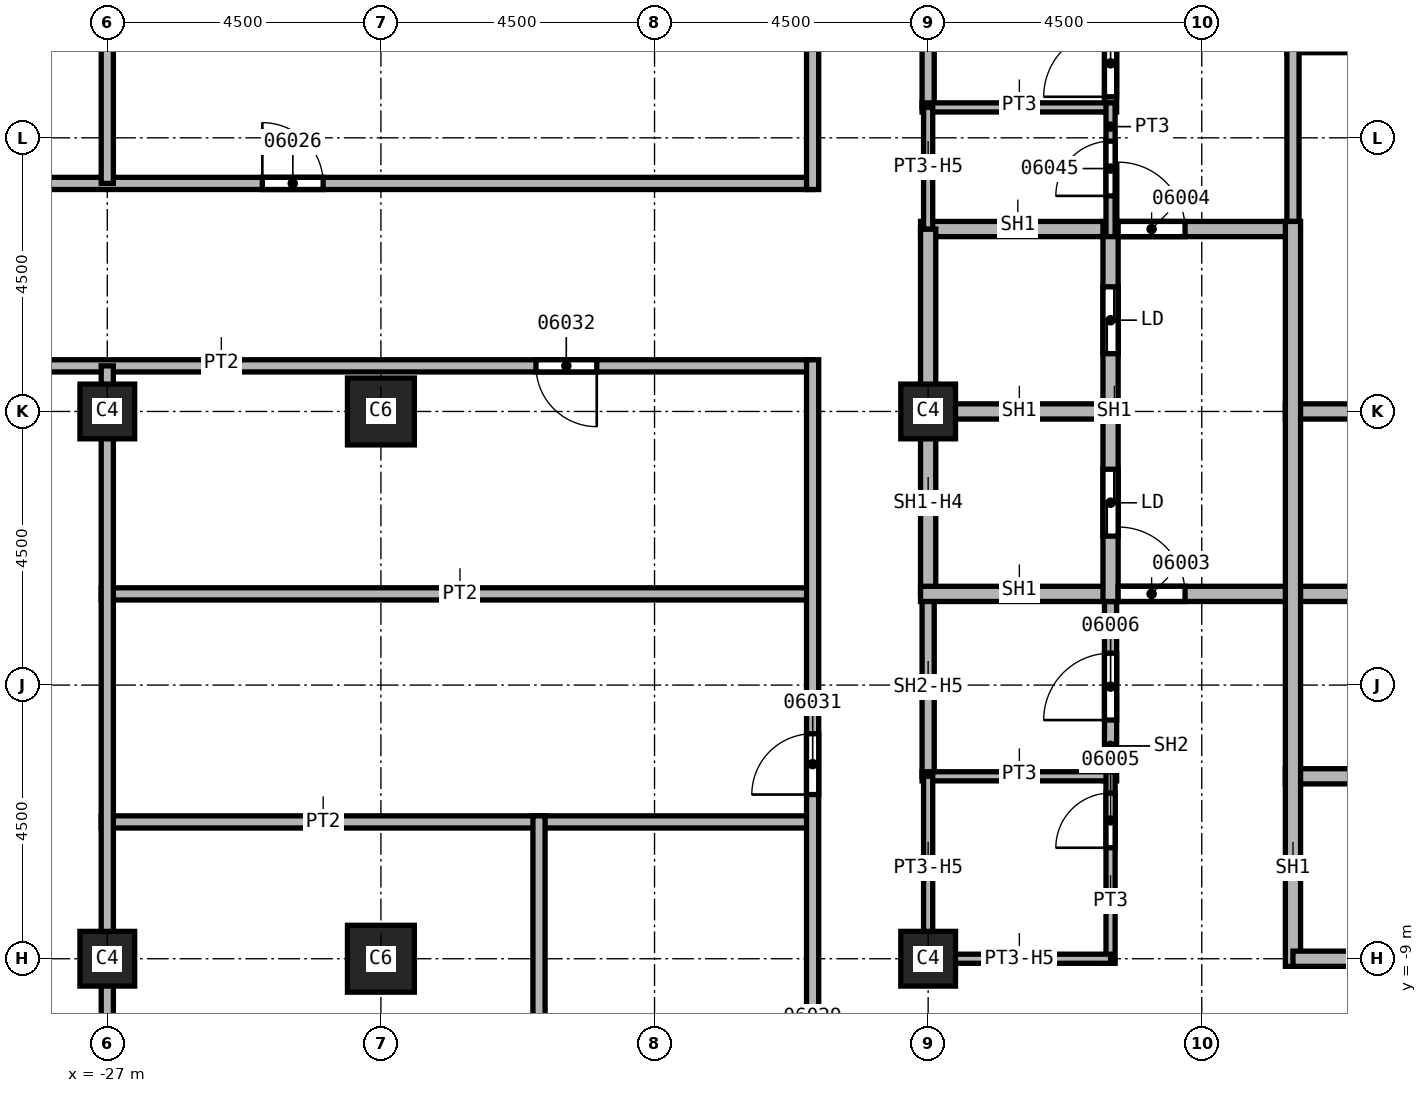
"""IFC4 building model, lengths in metres.
Left out: names, types, materials, properties, quantities, classifications, styles, units other than length and angle.
Written with IfcOpenShell. Run it as: python <this file> out.ifc"""

import sys

from ifc_helpers import new_model, si_unit, direction, frame, frame_2d, origin, origin_2d, place, context, subcontext, project, spatial, rectangle, extrude, element, fill, save


model = new_model("IFC4")
c1 = context("Model", 3, precision=1e-05, world=origin(), true_north=direction((0.0, 1.0)))
c2 = subcontext(c1, "Body", "Model", "MODEL_VIEW")
j1 = project(units=[si_unit("LENGTHUNIT", "METRE"), si_unit("PLANEANGLEUNIT", "RADIAN")], contexts=[c1])
p1 = place(None, origin())
s1 = spatial("IfcSite", under=j1, at=p1, CompositionType="ELEMENT")
p2 = place(p1, origin())
s2 = spatial("IfcBuilding", under=s1, at=p2, CompositionType="ELEMENT")
p3 = place(p2, frame((0.0, 0.0, 126.0)))
s3 = spatial("IfcBuildingStorey", under=s2, at=p3, CompositionType="ELEMENT", Elevation=126.0)
for number, where, z_axis, x_axis in (
    (1, (-22.5, 0.0, 0.0), (0.0, 0.0, 1.0), (1.0, 0.0, 0.0)),
    (2, (-22.5, -9.0, 0.0), (0.0, 0.0, 1.0), (1.0, 0.0, 0.0)),
):
    element("IfcColumn", number, at=place(p3, frame(where, z_axis=z_axis, x_axis=x_axis)), inside=s3, PredefinedType="COLUMN", context=c2, shape_type="SweptSolid", body=[
        extrude(rectangle(XDim=1.1, YDim=1.1, at=origin_2d()), origin(), (0.0, 0.0, 1.0), 3.7),
    ])
for number, where, z_axis, x_axis in (
    (3, (-13.5, 0.0, 0.0), (0.0, 0.0, 1.0), (1.0, 0.0, 0.0)),
    (4, (-13.5, -9.0, 0.0), (0.0, 0.0, 1.0), (1.0, 0.0, 0.0)),
    (5, (-27.0, 0.0, 0.0), (0.0, 0.0, 1.0), (1.0, 0.0, 0.0)),
    (6, (-27.0, -9.0, 0.0), (0.0, 0.0, 1.0), (1.0, 0.0, 0.0)),
):
    element("IfcColumn", number, at=place(p3, frame(where, z_axis=z_axis, x_axis=x_axis)), inside=s3, PredefinedType="COLUMN", context=c2, shape_type="SweptSolid", body=[
        extrude(rectangle(XDim=0.9, YDim=0.9, at=origin_2d()), origin(), (0.0, 0.0, 1.0), 3.7),
    ])
p4 = place(p3, frame((-33.85, 3.75, 0.0), z_axis=(0.0, 0.0, 1.0), x_axis=(1.0, 0.0, 0.0)))
e7 = element("IfcWall", 7, at=p4, inside=s3, PredefinedType="PARTITIONING", context=c2, shape_type="SweptSolid", body=[
    extrude(rectangle(XDim=18.45, YDim=0.2, at=frame_2d((9.225, 0.0))), origin(), (0.0, 0.0, 1.0), 3.7),
])
p5 = place(p4, frame((9.4, 0.0, 0.0)))
e8 = element("IfcOpeningElement", 8, at=p5, cuts=e7, PredefinedType="OPENING", context=c2, shape_type="SweptSolid", body=[
    extrude(rectangle(XDim=1.0, YDim=2.1, at=frame_2d((0.5, 1.05))), frame((0.0, 0.1, 0.0), z_axis=(0.0, -1.0, 0.0), x_axis=(1.0, 0.0, 0.0)), (0.0, 0.0, 1.0), 0.2),
])
p6 = place(p3, frame((-15.4, 0.75, 0.0), z_axis=(0.0, 0.0, 1.0), x_axis=(-1.0, 0.0, 0.0)))
e9 = element("IfcWall", 9, at=p6, inside=s3, PredefinedType="PARTITIONING", context=c2, shape_type="SweptSolid", body=[
    extrude(rectangle(XDim=18.45, YDim=0.2, at=frame_2d((9.225, 0.0))), origin(), (0.0, 0.0, 1.0), 3.7),
])
p7 = place(p6, frame((3.55, 0.0, 0.0)))
e10 = element("IfcOpeningElement", 10, at=p7, cuts=e9, PredefinedType="OPENING", context=c2, shape_type="SweptSolid", body=[
    extrude(rectangle(XDim=1.0, YDim=2.1, at=frame_2d((0.5, 1.05))), frame((0.0, 0.1, 0.0), z_axis=(0.0, -1.0, 0.0), x_axis=(1.0, 0.0, 0.0)), (0.0, 0.0, 1.0), 0.2),
])
p8 = place(p6, frame((14.9, 0.0, 0.0)))
e11 = element("IfcOpeningElement", 11, at=p8, cuts=e9, PredefinedType="OPENING", context=c2, shape_type="SweptSolid", body=[
    extrude(rectangle(XDim=1.0, YDim=2.1, at=frame_2d((0.5, 1.05))), frame((0.0, 0.1, 0.0), z_axis=(0.0, -1.0, 0.0), x_axis=(1.0, 0.0, 0.0)), (0.0, 0.0, 1.0), 0.2),
])
for number, where, z_axis, x_axis in (
    (12, (-27.1, -6.75, 0.0), (0.0, 0.0, 1.0), (1.0, 0.0, 0.0)),
    (13, (-27.1, -3.0, 0.0), (0.0, 0.0, 1.0), (1.0, 0.0, 0.0)),
):
    element("IfcWall", number, at=place(p3, frame(where, z_axis=z_axis, x_axis=x_axis)), inside=s3, PredefinedType="PARTITIONING", context=c2, shape_type="SweptSolid", body=[
        extrude(rectangle(XDim=11.7, YDim=0.2, at=frame_2d((5.85, 0.0))), origin(), (0.0, 0.0, 1.0), 3.7),
    ])
p9 = place(p3, frame((-27.0, -17.45, 0.0), z_axis=(0.0, 0.0, 1.0), x_axis=(0.0, 1.0, 0.0)))
e14 = element("IfcWall", 14, at=p9, inside=s3, PredefinedType="PARTITIONING", context=c2, shape_type="SweptSolid", body=[
    extrude(rectangle(XDim=18.2, YDim=0.2, at=frame_2d((9.1, 0.0))), origin(), (0.0, 0.0, 1.0), 3.7),
])
p10 = place(p3, frame((-27.0, 3.75, 0.0), z_axis=(0.0, 0.0, 1.0), x_axis=(0.0, 1.0, 0.0)))
e15 = element("IfcWall", 15, at=p10, inside=s3, PredefinedType="PARTITIONING", context=c2, shape_type="SweptSolid", body=[
    extrude(rectangle(XDim=13.7, YDim=0.2, at=frame_2d((6.85, 0.0))), origin(), (0.0, 0.0, 1.0), 3.7),
])
p11 = place(p3, frame((-19.9, -23.25, 0.0), z_axis=(0.0, 0.0, 1.0), x_axis=(0.0, 1.0, 0.0)))
e16 = element("IfcWall", 16, at=p11, inside=s3, PredefinedType="PARTITIONING", context=c2, shape_type="SweptSolid", body=[
    extrude(rectangle(XDim=16.6, YDim=0.2, at=frame_2d((8.3, 0.0))), origin(), (0.0, 0.0, 1.0), 3.7),
])
p12 = place(p11, frame((11.0, 0.0, 0.0)))
e17 = element("IfcOpeningElement", 17, at=p12, cuts=e16, PredefinedType="OPENING", context=c2, shape_type="SweptSolid", body=[
    extrude(rectangle(XDim=1.0, YDim=2.1, at=frame_2d((0.5, 1.05))), frame((0.0, 0.1, 0.0), z_axis=(0.0, -1.0, 0.0), x_axis=(1.0, 0.0, 0.0)), (0.0, 0.0, 1.0), 0.2),
])
p13 = place(p3, frame((-15.4, -23.25, 0.0), z_axis=(0.0, 0.0, 1.0), x_axis=(0.0, 1.0, 0.0)))
e18 = element("IfcWall", 18, at=p13, inside=s3, PredefinedType="PARTITIONING", context=c2, shape_type="SweptSolid", body=[
    extrude(rectangle(XDim=24.1, YDim=0.2, at=frame_2d((12.05, 0.0))), origin(), (0.0, 0.0, 1.0), 3.7),
])
p14 = place(p13, frame((4.6, 0.0, 0.0)))
e19 = element("IfcOpeningElement", 19, at=p14, cuts=e18, PredefinedType="OPENING", context=c2, shape_type="SweptSolid", body=[
    extrude(rectangle(XDim=1.0, YDim=2.1, at=frame_2d((0.5, 1.05))), frame((0.0, 0.1, 0.0), z_axis=(0.0, -1.0, 0.0), x_axis=(1.0, 0.0, 0.0)), (0.0, 0.0, 1.0), 0.2),
])
p15 = place(p13, frame((11.8, 0.0, 0.0)))
e20 = element("IfcOpeningElement", 20, at=p15, cuts=e18, PredefinedType="OPENING", context=c2, shape_type="SweptSolid", body=[
    extrude(rectangle(XDim=1.0, YDim=2.1, at=frame_2d((0.5, 1.05))), frame((0.0, 0.1, 0.0), z_axis=(0.0, -1.0, 0.0), x_axis=(1.0, 0.0, 0.0)), (0.0, 0.0, 1.0), 0.2),
])
p16 = place(p13, frame((16.95, 0.0, 0.0)))
e21 = element("IfcOpeningElement", 21, at=p16, cuts=e18, PredefinedType="OPENING", context=c2, shape_type="SweptSolid", body=[
    extrude(rectangle(XDim=1.0, YDim=2.1, at=frame_2d((0.5, 1.05))), frame((0.0, 0.1, 0.0), z_axis=(0.0, -1.0, 0.0), x_axis=(1.0, 0.0, 0.0)), (0.0, 0.0, 1.0), 0.2),
])
p17 = place(p3, frame((-15.4, 3.65, 0.0), z_axis=(0.0, 0.0, 1.0), x_axis=(0.0, 1.0, 0.0)))
e22 = element("IfcWall", 22, at=p17, inside=s3, PredefinedType="PARTITIONING", context=c2, shape_type="SweptSolid", body=[
    extrude(rectangle(XDim=9.95, YDim=0.2, at=frame_2d((4.975, 0.0))), origin(), (0.0, 0.0, 1.0), 3.7),
])
p18 = place(p3, frame((-13.5, -6.0, 0.0), z_axis=(0.0, 0.0, 1.0), x_axis=(0.0, 1.0, 0.0)))
e23 = element("IfcWall", 23, at=p18, inside=s3, PredefinedType="SOLIDWALL", context=c2, shape_type="SweptSolid", body=[
    extrude(rectangle(XDim=3.0, YDim=0.2, at=frame_2d((1.5, 0.0))), origin(), (0.0, 0.0, 1.0), 2.938),
])
p19 = place(p3, frame((-13.5, 5.0, 0.0), z_axis=(0.0, 0.0, 1.0), x_axis=(0.0, 1.0, 0.0)))
e24 = element("IfcWall", 24, at=p19, inside=s3, PredefinedType="SOLIDWALL", context=c2, shape_type="SweptSolid", body=[
    extrude(rectangle(XDim=4.1, YDim=0.2, at=frame_2d((2.05, 0.0))), origin(), (0.0, 0.0, 1.0), 2.938),
])
p20 = place(p3, frame((-10.5, -6.075, 0.0), z_axis=(0.0, 0.0, 1.0), x_axis=(0.0, 1.0, 0.0)))
e25 = element("IfcWall", 25, at=p20, inside=s3, PredefinedType="SOLIDWALL", context=c2, shape_type="SweptSolid", body=[
    extrude(rectangle(XDim=3.2, YDim=0.2, at=frame_2d((1.6, 0.0))), origin(), (0.0, 0.0, 1.0), 3.7),
])
p21 = place(p20, frame((1.0, 0.0, 0.0)))
e26 = element("IfcOpeningElement", 26, at=p21, cuts=e25, PredefinedType="OPENING", context=c2, shape_type="SweptSolid", body=[
    extrude(rectangle(XDim=1.1, YDim=2.1, at=frame_2d((0.55, 1.05))), frame((0.0, 0.1, 0.0), z_axis=(0.0, -1.0, 0.0), x_axis=(1.0, 0.0, 0.0)), (0.0, 0.0, 1.0), 0.2),
])
p22 = place(p3, frame((-10.5, 4.925, 0.0), z_axis=(0.0, 0.0, 1.0), x_axis=(0.0, 1.0, 0.0)))
e27 = element("IfcWall", 27, at=p22, inside=s3, PredefinedType="SOLIDWALL", context=c2, shape_type="SweptSolid", body=[
    extrude(rectangle(XDim=4.175, YDim=0.2, at=frame_2d((2.087, 0.0))), origin(), (0.0, 0.0, 1.0), 3.7),
])
p23 = place(p22, frame((0.25, 0.0, 0.0)))
e28 = element("IfcOpeningElement", 28, at=p23, cuts=e27, PredefinedType="OPENING", context=c2, shape_type="SweptSolid", body=[
    extrude(rectangle(XDim=1.1, YDim=2.1, at=frame_2d((0.55, 1.05))), frame((0.0, 0.1, 0.0), z_axis=(0.0, -1.0, 0.0), x_axis=(1.0, 0.0, 0.0)), (0.0, 0.0, 1.0), 0.2),
])
p24 = place(p3, frame((-7.5, 2.875, 0.0), z_axis=(0.0, 0.0, 1.0), x_axis=(0.0, 1.0, 0.0)))
e29 = element("IfcWall", 29, at=p24, inside=s3, PredefinedType="SOLIDWALL", context=c2, shape_type="SweptSolid", body=[
    extrude(rectangle(XDim=6.225, YDim=0.2, at=frame_2d((3.113, 0.0))), origin(), (0.0, 0.0, 1.0), 3.7),
])
p25 = place(p3, frame((-13.625, 0.0, 0.0), z_axis=(0.0, 0.0, 1.0), x_axis=(1.0, 0.0, 0.0)))
e30 = element("IfcWall", 30, at=p25, inside=s3, PredefinedType="SOLIDWALL", context=c2, shape_type="SweptSolid", body=[
    extrude(rectangle(XDim=3.125, YDim=0.25, at=frame_2d((1.562, 0.0))), origin(), (0.0, 0.0, 1.0), 3.7),
])
p26 = place(p3, frame((-13.625, 3.0, 0.0), z_axis=(0.0, 0.0, 1.0), x_axis=(1.0, 0.0, 0.0)))
e31 = element("IfcWall", 31, at=p26, inside=s3, PredefinedType="SOLIDWALL", context=c2, shape_type="SweptSolid", body=[
    extrude(rectangle(XDim=6.125, YDim=0.25, at=frame_2d((3.062, 0.0))), origin(), (0.0, 0.0, 1.0), 3.7),
])
p27 = place(p26, frame((3.25, 0.0, 0.0)))
e32 = element("IfcOpeningElement", 32, at=p27, cuts=e31, PredefinedType="OPENING", context=c2, shape_type="SweptSolid", body=[
    extrude(rectangle(XDim=1.1, YDim=2.1, at=frame_2d((0.55, 1.05))), frame((0.0, 0.125, 0.0), z_axis=(0.0, -1.0, 0.0), x_axis=(1.0, 0.0, 0.0)), (0.0, 0.0, 1.0), 0.25),
])
p28 = place(p3, frame((-13.5, -3.0, 0.0), z_axis=(0.0, 0.0, 1.0), x_axis=(0.0, 1.0, 0.0)))
e33 = element("IfcWall", 33, at=p28, inside=s3, PredefinedType="SOLIDWALL", context=c2, shape_type="SweptSolid", body=[
    extrude(rectangle(XDim=6.0, YDim=0.25, at=frame_2d((3.0, 0.0))), origin(), (0.0, 0.0, 1.0), 2.938),
])
p29 = place(p3, frame((-13.625, -3.0, 0.0), z_axis=(0.0, 0.0, 1.0), x_axis=(1.0, 0.0, 0.0)))
e34 = element("IfcWall", 34, at=p29, inside=s3, PredefinedType="SOLIDWALL", context=c2, shape_type="SweptSolid", body=[
    extrude(rectangle(XDim=9.25, YDim=0.25, at=frame_2d((4.625, 0.0))), origin(), (0.0, 0.0, 1.0), 3.7),
])
p30 = place(p29, frame((3.25, 0.0, 0.0)))
e35 = element("IfcOpeningElement", 35, at=p30, cuts=e34, PredefinedType="OPENING", context=c2, shape_type="SweptSolid", body=[
    extrude(rectangle(XDim=1.1, YDim=2.1, at=frame_2d((0.55, 1.05))), frame((0.0, 0.125, 0.0), z_axis=(0.0, -1.0, 0.0), x_axis=(1.0, 0.0, 0.0)), (0.0, 0.0, 1.0), 0.25),
])
p31 = place(p3, frame((-10.5, -3.125, 0.0), z_axis=(0.0, 0.0, 1.0), x_axis=(0.0, 1.0, 0.0)))
e36 = element("IfcWall", 36, at=p31, inside=s3, PredefinedType="SOLIDWALL", context=c2, shape_type="SweptSolid", body=[
    extrude(rectangle(XDim=6.25, YDim=0.25, at=frame_2d((3.125, 0.0))), origin(), (0.0, 0.0, 1.0), 3.7),
])
p32 = place(p31, frame((1.075, 0.0, 0.0)))
e37 = element("IfcOpeningElement", 37, at=p32, cuts=e36, PredefinedType="OPENING", context=c2, shape_type="SweptSolid", body=[
    extrude(rectangle(XDim=1.1, YDim=2.1, at=frame_2d((0.55, 1.05))), frame((0.0, 0.125, 0.0), z_axis=(0.0, -1.0, 0.0), x_axis=(1.0, 0.0, 0.0)), (0.0, 0.0, 1.0), 0.25),
])
p33 = place(p31, frame((4.075, 0.0, 0.0)))
e38 = element("IfcOpeningElement", 38, at=p33, cuts=e36, PredefinedType="OPENING", context=c2, shape_type="SweptSolid", body=[
    extrude(rectangle(XDim=1.1, YDim=2.1, at=frame_2d((0.55, 1.05))), frame((0.0, 0.125, 0.0), z_axis=(0.0, -1.0, 0.0), x_axis=(1.0, 0.0, 0.0)), (0.0, 0.0, 1.0), 0.25),
])
for number, where, z_axis, x_axis in (
    (39, (-7.625, -6.0, 0.0), (0.0, 0.0, 1.0), (1.0, 0.0, 0.0)),
    (40, (-7.625, 0.0, 0.0), (0.0, 0.0, 1.0), (1.0, 0.0, 0.0)),
):
    element("IfcWall", number, at=place(p3, frame(where, z_axis=z_axis, x_axis=x_axis)), inside=s3, PredefinedType="SOLIDWALL", context=c2, shape_type="SweptSolid", body=[
        extrude(rectangle(XDim=3.25, YDim=0.25, at=frame_2d((1.625, 0.0))), origin(), (0.0, 0.0, 1.0), 3.7),
    ])
p34 = place(p3, frame((-7.5, -9.125, 0.0), z_axis=(0.0, 0.0, 1.0), x_axis=(0.0, 1.0, 0.0)))
e41 = element("IfcWall", 41, at=p34, inside=s3, PredefinedType="SOLIDWALL", context=c2, shape_type="SweptSolid", body=[
    extrude(rectangle(XDim=12.25, YDim=0.25, at=frame_2d((6.125, 0.0))), origin(), (0.0, 0.0, 1.0), 3.7),
])
p35 = place(p3, frame((-4.5, -9.0, 0.0), z_axis=(0.0, 0.0, 1.0), x_axis=(-1.0, 0.0, 0.0)))
e42 = element("IfcWall", 42, at=p35, inside=s3, PredefinedType="SOLIDWALL", context=c2, shape_type="SweptSolid", body=[
    extrude(rectangle(XDim=3.0, YDim=0.25, at=frame_2d((1.5, 0.0))), origin(), (0.0, 0.0, 1.0), 2.938),
])
for number, where, z_axis, x_axis in (
    (43, (-13.6, -6.0, 0.0), (0.0, 0.0, 1.0), (1.0, 0.0, 0.0)),
    (44, (-13.6, 5.0, 0.0), (0.0, 0.0, 1.0), (1.0, 0.0, 0.0)),
):
    element("IfcWall", number, at=place(p3, frame(where, z_axis=z_axis, x_axis=x_axis)), inside=s3, PredefinedType="PARTITIONING", context=c2, shape_type="SweptSolid", body=[
        extrude(rectangle(XDim=3.1, YDim=0.15, at=frame_2d((1.55, 0.0))), origin(), (0.0, 0.0, 1.0), 3.7),
    ])
p36 = place(p3, frame((-13.5, -9.075, 0.0), z_axis=(0.0, 0.0, 1.0), x_axis=(0.0, 1.0, 0.0)))
e45 = element("IfcWall", 45, at=p36, inside=s3, PredefinedType="PARTITIONING", context=c2, shape_type="SweptSolid", body=[
    extrude(rectangle(XDim=3.075, YDim=0.15, at=frame_2d((1.538, 0.0))), origin(), (0.0, 0.0, 1.0), 2.938),
])
p37 = place(p3, frame((-13.5, 3.0, 0.0), z_axis=(0.0, 0.0, 1.0), x_axis=(0.0, 1.0, 0.0)))
e46 = element("IfcWall", 46, at=p37, inside=s3, PredefinedType="PARTITIONING", context=c2, shape_type="SweptSolid", body=[
    extrude(rectangle(XDim=2.0, YDim=0.15, at=frame_2d((1.0, 0.0))), origin(), (0.0, 0.0, 1.0), 2.938),
])
p38 = place(p3, frame((-10.5, -9.075, 0.0), z_axis=(0.0, 0.0, 1.0), x_axis=(0.0, 1.0, 0.0)))
e47 = element("IfcWall", 47, at=p38, inside=s3, PredefinedType="PARTITIONING", context=c2, shape_type="SweptSolid", body=[
    extrude(rectangle(XDim=3.15, YDim=0.15, at=frame_2d((1.575, 0.0))), origin(), (0.0, 0.0, 1.0), 3.7),
])
p39 = place(p38, frame((1.9, 0.0, 0.0)))
e48 = element("IfcOpeningElement", 48, at=p39, cuts=e47, PredefinedType="OPENING", context=c2, shape_type="SweptSolid", body=[
    extrude(rectangle(XDim=0.9, YDim=2.1, at=frame_2d((0.45, 1.05))), frame((0.0, 0.075, 0.0), z_axis=(0.0, -1.0, 0.0), x_axis=(1.0, 0.0, 0.0)), (0.0, 0.0, 1.0), 0.15),
])
p40 = place(p3, frame((-10.5, -9.0, 0.0), z_axis=(0.0, 0.0, 1.0), x_axis=(-1.0, 0.0, 0.0)))
e49 = element("IfcWall", 49, at=p40, inside=s3, PredefinedType="PARTITIONING", context=c2, shape_type="SweptSolid", body=[
    extrude(rectangle(XDim=3.0, YDim=0.15, at=frame_2d((1.5, 0.0))), origin(), (0.0, 0.0, 1.0), 2.938),
])
p41 = place(p3, frame((-10.5, 2.875, 0.0), z_axis=(0.0, 0.0, 1.0), x_axis=(0.0, 1.0, 0.0)))
e50 = element("IfcWall", 50, at=p41, inside=s3, PredefinedType="PARTITIONING", context=c2, shape_type="SweptSolid", body=[
    extrude(rectangle(XDim=2.2, YDim=0.15, at=frame_2d((1.1, 0.0))), origin(), (0.0, 0.0, 1.0), 3.7),
])
p42 = place(p41, frame((0.67, 0.0, 0.0)))
e51 = element("IfcOpeningElement", 51, at=p42, cuts=e50, PredefinedType="OPENING", context=c2, shape_type="SweptSolid", body=[
    extrude(rectangle(XDim=0.9, YDim=2.1, at=frame_2d((0.45, 1.05))), frame((0.0, 0.075, 0.0), z_axis=(0.0, -1.0, 0.0), x_axis=(1.0, 0.0, 0.0)), (0.0, 0.0, 1.0), 0.15),
])
p43 = place(p30, origin())
e52 = element("IfcDoor", 52, at=p43, inside=s3, OperationType="SINGLE_SWING_RIGHT", PredefinedType="DOOR", context=c2, shape_type="SweptSolid", body=[
    extrude(rectangle(XDim=1.1, YDim=2.1, at=frame_2d((0.55, 1.05))), frame((0.0, 0.025, 0.0), z_axis=(0.0, -1.0, 0.0), x_axis=(1.0, 0.0, 0.0)), (0.0, 0.0, 1.0), 0.05),
])
fill(e35, e52)
p44 = place(p27, origin())
e53 = element("IfcDoor", 53, at=p44, inside=s3, OperationType="SINGLE_SWING_LEFT", PredefinedType="DOOR", context=c2, shape_type="SweptSolid", body=[
    extrude(rectangle(XDim=1.1, YDim=2.1, at=frame_2d((0.55, 1.05))), frame((0.0, 0.025, 0.0), z_axis=(0.0, -1.0, 0.0), x_axis=(1.0, 0.0, 0.0)), (0.0, 0.0, 1.0), 0.05),
])
fill(e32, e53)
p45 = place(p39, origin())
e54 = element("IfcDoor", 54, at=p45, inside=s3, OperationType="SINGLE_SWING_RIGHT", PredefinedType="DOOR", context=c2, shape_type="SweptSolid", body=[
    extrude(rectangle(XDim=0.9, YDim=2.1, at=frame_2d((0.45, 1.05))), frame((0.0, 0.025, 0.0), z_axis=(0.0, -1.0, 0.0), x_axis=(1.0, 0.0, 0.0)), (0.0, 0.0, 1.0), 0.05),
])
fill(e48, e54)
p46 = place(p21, origin())
e55 = element("IfcDoor", 55, at=p46, inside=s3, OperationType="SINGLE_SWING_LEFT", PredefinedType="DOOR", context=c2, shape_type="SweptSolid", body=[
    extrude(rectangle(XDim=1.1, YDim=2.1, at=frame_2d((0.55, 1.05))), frame((0.0, 0.025, 0.0), z_axis=(0.0, -1.0, 0.0), x_axis=(1.0, 0.0, 0.0)), (0.0, 0.0, 1.0), 0.05),
])
fill(e26, e55)
p47 = place(p23, origin())
e56 = element("IfcDoor", 56, at=p47, inside=s3, OperationType="SINGLE_SWING_RIGHT", PredefinedType="DOOR", context=c2, shape_type="SweptSolid", body=[
    extrude(rectangle(XDim=1.1, YDim=2.1, at=frame_2d((0.55, 1.05))), frame((0.0, 0.025, 0.0), z_axis=(0.0, -1.0, 0.0), x_axis=(1.0, 0.0, 0.0)), (0.0, 0.0, 1.0), 0.05),
])
fill(e28, e56)
p48 = place(p5, origin())
e57 = element("IfcDoor", 57, at=p48, inside=s3, OperationType="SINGLE_SWING_LEFT", PredefinedType="DOOR", context=c2, shape_type="SweptSolid", body=[
    extrude(rectangle(XDim=1.0, YDim=2.1, at=frame_2d((0.5, 1.05))), frame((0.0, 0.025, 0.0), z_axis=(0.0, -1.0, 0.0), x_axis=(1.0, 0.0, 0.0)), (0.0, 0.0, 1.0), 0.05),
])
fill(e8, e57)
p49 = place(p16, origin())
e58 = element("IfcDoor", 58, at=p49, inside=s3, OperationType="SINGLE_SWING_RIGHT", PredefinedType="DOOR", context=c2, shape_type="SweptSolid", body=[
    extrude(rectangle(XDim=1.0, YDim=2.1, at=frame_2d((0.5, 1.05))), frame((0.0, 0.025, 0.0), z_axis=(0.0, -1.0, 0.0), x_axis=(1.0, 0.0, 0.0)), (0.0, 0.0, 1.0), 0.05),
])
fill(e21, e58)
p50 = place(p7, origin())
e59 = element("IfcDoor", 59, at=p50, inside=s3, OperationType="SINGLE_SWING_LEFT", PredefinedType="DOOR", context=c2, shape_type="SweptSolid", body=[
    extrude(rectangle(XDim=1.0, YDim=2.1, at=frame_2d((0.5, 1.05))), frame((0.0, 0.025, 0.0), z_axis=(0.0, -1.0, 0.0), x_axis=(1.0, 0.0, 0.0)), (0.0, 0.0, 1.0), 0.05),
])
fill(e10, e59)
p51 = place(p42, origin())
e60 = element("IfcDoor", 60, at=p51, inside=s3, OperationType="SINGLE_SWING_LEFT", PredefinedType="DOOR", context=c2, shape_type="SweptSolid", body=[
    extrude(rectangle(XDim=0.9, YDim=2.1, at=frame_2d((0.45, 1.05))), frame((0.0, 0.025, 0.0), z_axis=(0.0, -1.0, 0.0), x_axis=(1.0, 0.0, 0.0)), (0.0, 0.0, 1.0), 0.05),
])
fill(e51, e60)
p52 = place(p32, origin())
e61 = element("IfcDoor", 61, at=p52, inside=s3, OperationType="SLIDING_TO_LEFT", PredefinedType="DOOR", context=c2, shape_type="SweptSolid", body=[
    extrude(rectangle(XDim=1.1, YDim=2.1, at=frame_2d((0.55, 1.05))), frame((0.0, 0.025, 0.0), z_axis=(0.0, -1.0, 0.0), x_axis=(1.0, 0.0, 0.0)), (0.0, 0.0, 1.0), 0.05),
])
fill(e37, e61)
p53 = place(p33, origin())
e62 = element("IfcDoor", 62, at=p53, inside=s3, OperationType="SLIDING_TO_LEFT", PredefinedType="DOOR", context=c2, shape_type="SweptSolid", body=[
    extrude(rectangle(XDim=1.1, YDim=2.1, at=frame_2d((0.55, 1.05))), frame((0.0, 0.025, 0.0), z_axis=(0.0, -1.0, 0.0), x_axis=(1.0, 0.0, 0.0)), (0.0, 0.0, 1.0), 0.05),
])
fill(e38, e62)
save(model, sys.argv[1])
